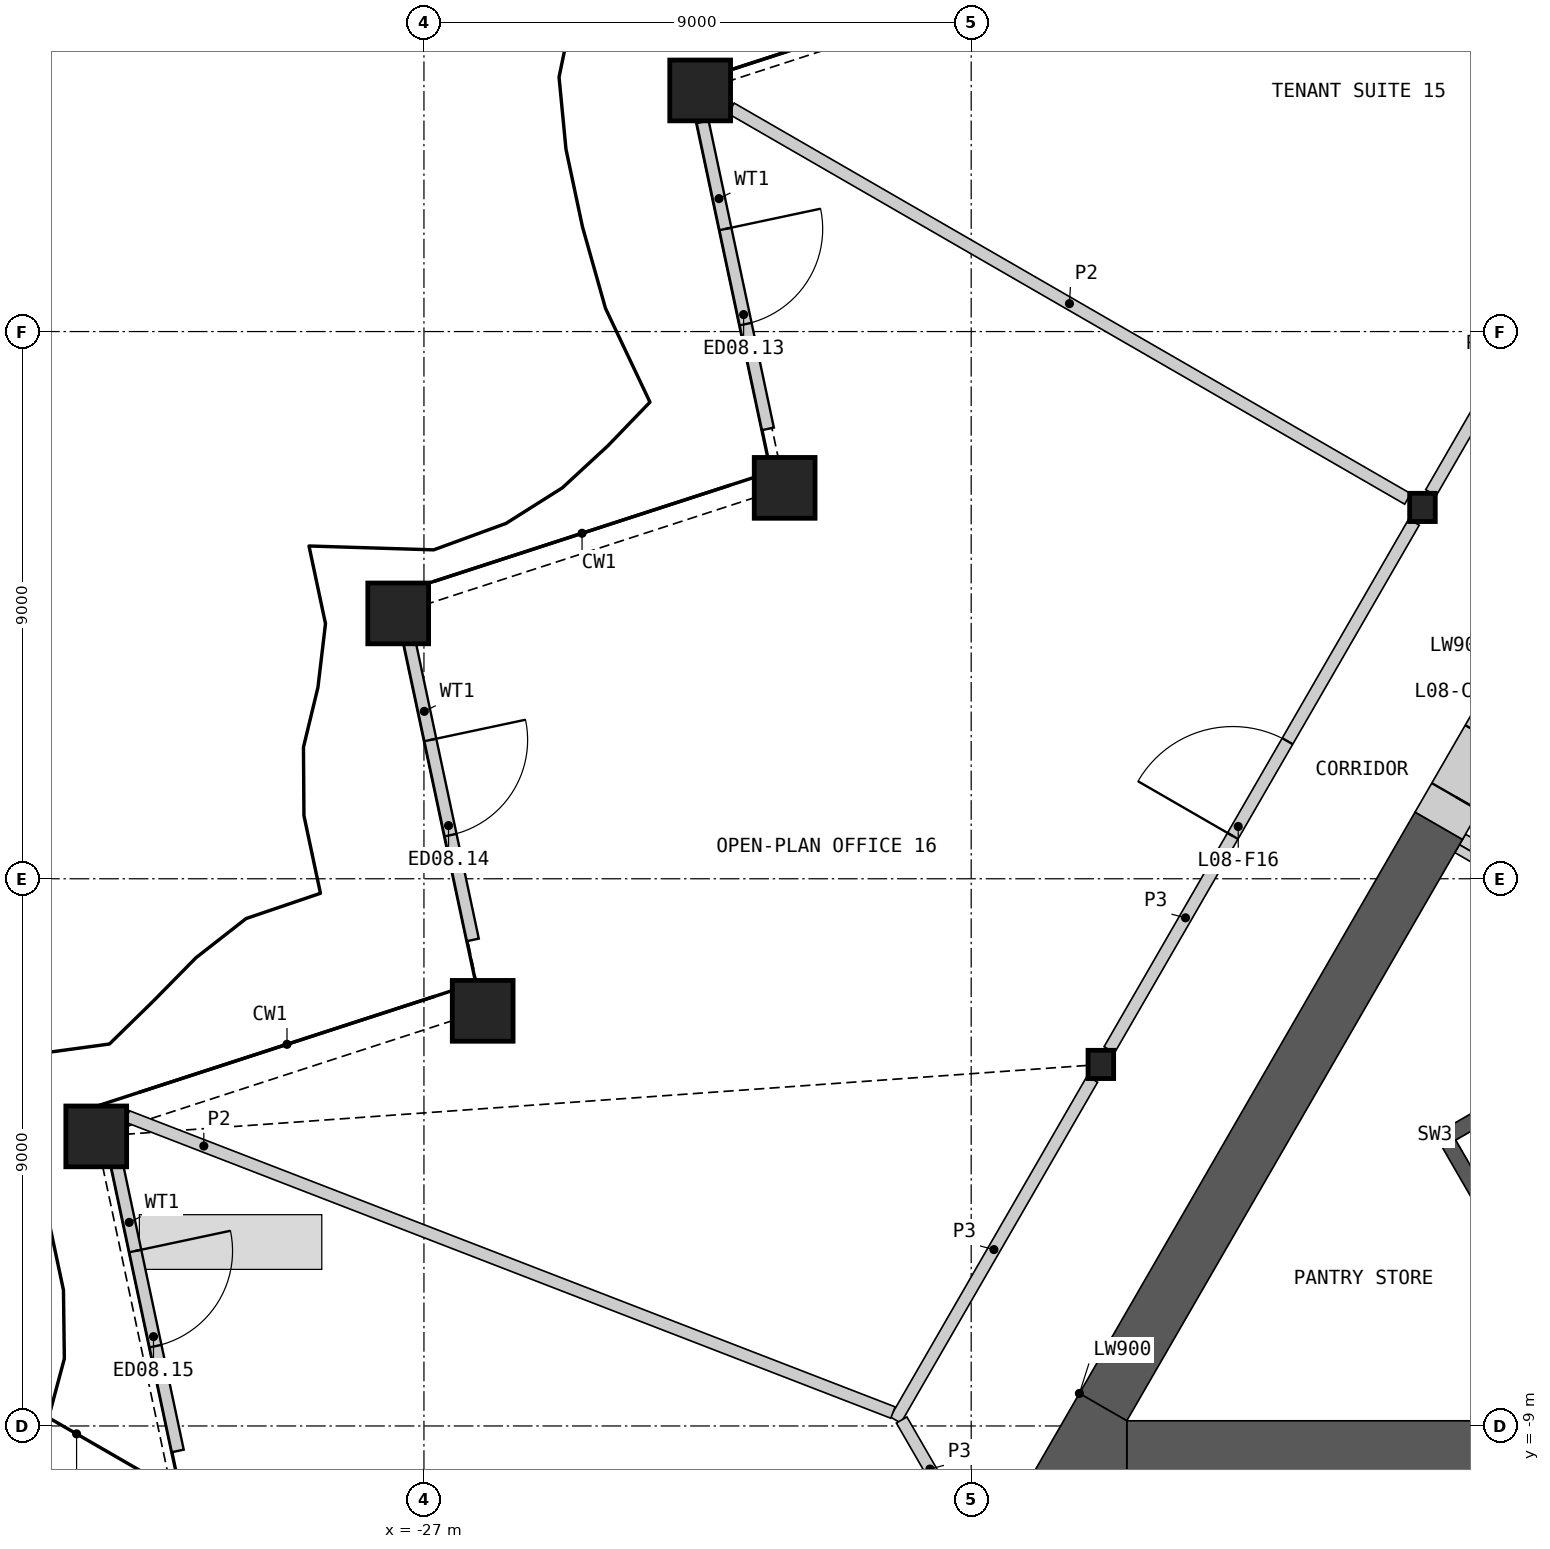
"""IFC4 building model, lengths in metres.
Left out: names, types, materials, properties, quantities, classifications, styles, units other than length and angle.
Written with IfcOpenShell. Run it as: python <this file> out.ifc"""

import sys

from ifc_helpers import new_model, si_unit, direction, frame, frame_2d, origin, origin_2d, place, context, subcontext, project, spatial, polyline, rectangle, hollow_rectangle, i_section, outline, extrude, element, fill, save


model = new_model("IFC4")
c1 = context("Model", 3, precision=1e-05, world=origin(), true_north=direction((0.0, 1.0)))
c2 = subcontext(c1, "Body", "Model", "MODEL_VIEW")
j1 = project(units=[si_unit("LENGTHUNIT", "METRE"), si_unit("PLANEANGLEUNIT", "RADIAN")], contexts=[c1])
p1 = place(None, origin())
s1 = spatial("IfcSite", under=j1, at=p1, CompositionType="ELEMENT")
p2 = place(p1, origin())
s2 = spatial("IfcBuilding", under=s1, at=p2, CompositionType="ELEMENT")
p3 = place(p2, frame((0.0, 0.0, 42.6)))
s3 = spatial("IfcBuildingStorey", under=s2, at=p3, CompositionType="ELEMENT", Elevation=42.6)
for number, where, z_axis, x_axis in (
    (1, (-22.457, 12.966, 0.0), (0.0, 0.0, 1.0), (1.0, 0.0, 0.0)),
    (2, (-21.068, 6.429, 0.0), (0.0, 0.0, 1.0), (1.0, 0.0, 0.0)),
    (3, (-27.423, 4.364, 0.0), (0.0, 0.0, 1.0), (1.0, 0.0, 0.0)),
    (4, (-26.034, -2.172, 0.0), (0.0, 0.0, 1.0), (1.0, 0.0, 0.0)),
    (5, (-32.389, -4.237, 0.0), (0.0, 0.0, 1.0), (1.0, 0.0, 0.0)),
):
    element("IfcColumn", number, at=place(p3, frame(where, z_axis=z_axis, x_axis=x_axis)), inside=s3, PredefinedType="COLUMN", context=c2, shape_type="SweptSolid", body=[
        extrude(hollow_rectangle(XDim=1.0, YDim=1.0, WallThickness=0.07, at=origin_2d()), origin(), (0.0, 0.0, 1.0), 4.2),
    ])
for number, where, z_axis, x_axis in (
    (6, (-10.578, 6.107, 0.0), (0.0, 0.0, 1.0), (1.0, 0.0, 0.0)),
    (7, (-15.868, -3.054, 0.0), (0.0, 0.0, 1.0), (1.0, 0.0, 0.0)),
):
    element("IfcColumn", number, at=place(p3, frame(where, z_axis=z_axis, x_axis=x_axis)), inside=s3, PredefinedType="COLUMN", context=c2, shape_type="SweptSolid", body=[
        extrude(i_section(OverallWidth=0.421, OverallDepth=0.465, WebThickness=0.045, FlangeThickness=0.072, at=origin_2d()), origin(), (0.0, 0.0, 1.0), 4.2),
    ])
p4 = place(p3, frame((-22.416, 12.449, 0.0), z_axis=(0.0, 0.0, 1.0), x_axis=(0.207907400709, -0.978148512615, 0.0)))
e8 = element("IfcWall", 8, at=p4, inside=s3, PredefinedType="SOLIDWALL", context=c2, shape_type="SweptSolid", body=[
    extrude(rectangle(XDim=5.162, YDim=0.2, at=frame_2d((2.581, 0.0))), origin(), (0.0, 0.0, 1.0), 3.189),
])
p5 = place(p4, frame((1.8, 0.0, 0.0)))
e9 = element("IfcOpeningElement", 9, at=p5, cuts=e8, PredefinedType="OPENING", context=c2, shape_type="SweptSolid", body=[
    extrude(rectangle(XDim=1.6, YDim=2.4, at=frame_2d((0.8, 1.2))), frame((0.0, 0.11, 0.0), z_axis=(0.0, -1.0, 0.0), x_axis=(1.0, 0.0, 0.0)), (0.0, 0.0, 1.0), 0.22),
])
p6 = place(p3, frame((-27.261, 4.006, 0.0), z_axis=(0.0, 0.0, 1.0), x_axis=(0.207885539143, -0.978153159079, 0.0)))
e10 = element("IfcWall", 10, at=p6, inside=s3, PredefinedType="SOLIDWALL", context=c2, shape_type="SweptSolid", body=[
    extrude(rectangle(XDim=5.124, YDim=0.2, at=frame_2d((2.562, 0.0))), origin(), (0.0, 0.0, 1.0), 3.189),
])
p7 = place(p6, frame((1.762, 0.0, 0.0)))
e11 = element("IfcOpeningElement", 11, at=p7, cuts=e10, PredefinedType="OPENING", context=c2, shape_type="SweptSolid", body=[
    extrude(rectangle(XDim=1.6, YDim=2.4, at=frame_2d((0.8, 1.2))), frame((0.0, 0.11, 0.0), z_axis=(0.0, -1.0, 0.0), x_axis=(1.0, 0.0, 0.0)), (0.0, 0.0, 1.0), 0.22),
])
p8 = place(p3, frame((-32.114, -4.399, 0.0), z_axis=(0.0, 0.0, 1.0), x_axis=(0.207931126702, -0.978143469307, 0.0)))
e12 = element("IfcWall", 12, at=p8, inside=s3, PredefinedType="SOLIDWALL", context=c2, shape_type="SweptSolid", body=[
    extrude(rectangle(XDim=5.124, YDim=0.2, at=frame_2d((2.562, 0.0))), origin(), (0.0, 0.0, 1.0), 3.189),
])
p9 = place(p8, frame((1.762, 0.0, 0.0)))
e13 = element("IfcOpeningElement", 13, at=p9, cuts=e12, PredefinedType="OPENING", context=c2, shape_type="SweptSolid", body=[
    extrude(rectangle(XDim=1.6, YDim=2.4, at=frame_2d((0.8, 1.2))), frame((0.0, 0.11, 0.0), z_axis=(0.0, -1.0, 0.0), x_axis=(1.0, 0.0, 0.0)), (0.0, 0.0, 1.0), 0.22),
])
p10 = place(p3, frame((-8.181, -0.357, 0.0), z_axis=(0.0, 0.0, 1.0), x_axis=(-0.866035824272, 0.499981950752, 0.0)))
e14 = element("IfcWall", 14, at=p10, inside=s3, PredefinedType="SHEAR", context=c2, shape_type="SweptSolid", body=[
    extrude(rectangle(XDim=2.009, YDim=0.2, at=frame_2d((1.004, 0.0))), origin(), (0.0, 0.0, 1.0), 3.8),
])
p11 = place(p3, origin())
e15 = element("IfcWall", 15, at=p11, inside=s3, PredefinedType="SHEAR", context=c2, shape_type="SweptSolid", body=[
    extrude(outline(polyline([(-5.307, -1.281), (-10.374, -4.206), (-10.032, -4.298), (-5.182, -1.498), (-5.307, -1.281)])), origin(), (0.0, 0.0, 1.0), 3.8),
])
p12 = place(p3, origin())
e16 = element("IfcWall", 16, at=p12, inside=s3, PredefinedType="SHEAR", context=c2, shape_type="SweptSolid", body=[
    extrude(outline(polyline([(-10.374, -4.206), (-8.83, -6.881), (-8.738, -6.539), (-10.032, -4.298), (-10.374, -4.206)])), origin(), (0.0, 0.0, 1.0), 3.8),
])
p13 = place(p3, frame((-8.268, -0.509, 0.0), z_axis=(0.0, 0.0, 1.0), x_axis=(-0.866035824272, 0.499981950752, 0.0)))
e17 = element("IfcWall", 17, at=p13, inside=s3, PredefinedType="PARTITIONING", context=c2, shape_type="SweptSolid", body=[
    extrude(rectangle(XDim=2.009, YDim=0.15, at=frame_2d((1.004, 0.0))), origin(), (0.0, 0.0, 1.0), 3.8),
])
p14 = place(p3, frame((-15.441, -9.365, 0.0), z_axis=(0.0, 0.0, 1.0), x_axis=(1.0, 0.0, 0.0)))
e18 = element("IfcWall", 18, at=p14, inside=s3, PredefinedType="SHEAR", context=c2, shape_type="SweptSolid", body=[
    extrude(rectangle(XDim=8.871, YDim=0.9, at=frame_2d((4.435, 0.0))), origin(), (0.0, 0.0, 1.0), 3.8),
])
p15 = place(p3, frame((-10.31, 0.872, 0.0), z_axis=(0.0, 0.0, 1.0), x_axis=(-0.499991697393, -0.866030197244, 0.0)))
e19 = element("IfcWall", 19, at=p15, inside=s3, PredefinedType="SHEAR", context=c2, shape_type="SweptSolid", body=[
    extrude(rectangle(XDim=11.041, YDim=0.9, at=frame_2d((5.521, 0.0))), origin(), (0.0, 0.0, 1.0), 3.8),
])
p16 = place(p3, origin())
e20 = element("IfcWall", 20, at=p16, inside=s3, PredefinedType="SHEAR", context=c2, shape_type="SweptSolid", body=[
    extrude(outline(polyline([(-16.221, -8.465), (-15.441, -8.915), (-15.441, -9.815), (-17.0, -9.815), (-16.221, -8.465)])), origin(), (0.0, 0.0, 1.0), 3.8),
])
p17 = place(p3, frame((-9.21, 2.777, 0.0), z_axis=(0.0, 0.0, 1.0), x_axis=(-0.500077893725, -0.86598042715, 0.0)))
e21 = element("IfcWall", 21, at=p17, inside=s3, PredefinedType="SHEAR", context=c2, shape_type="SweptSolid", body=[
    extrude(rectangle(XDim=2.2, YDim=0.9, at=frame_2d((1.1, 0.0))), origin(), (0.0, 0.0, 1.0), 3.8),
])
p18 = place(p17, frame((0.55, 0.0, 0.0)))
e22 = element("IfcOpeningElement", 22, at=p18, cuts=e21, PredefinedType="OPENING", context=c2, shape_type="SweptSolid", body=[
    extrude(rectangle(XDim=1.1, YDim=2.1, at=frame_2d((0.55, 1.05))), frame((0.0, 0.46, 0.0), z_axis=(0.0, -1.0, 0.0), x_axis=(1.0, 0.0, 0.0)), (0.0, 0.0, 1.0), 0.92),
])
p19 = place(p3, frame((-10.439, 6.35, 0.0), z_axis=(0.0, 0.0, 1.0), x_axis=(0.50001002959, 0.86601961312, 0.0)))
e23 = element("IfcWall", 23, at=p19, inside=s3, PredefinedType="PARTITIONING", context=c2, shape_type="SweptSolid", body=[
    extrude(rectangle(XDim=10.019, YDim=0.2, at=frame_2d((5.009, 0.0))), origin(), (0.0, 0.0, 1.0), 3.8),
])
p20 = place(p19, frame((4.159, 0.0, 0.0)))
e24 = element("IfcOpeningElement", 24, at=p20, cuts=e23, PredefinedType="OPENING", context=c2, shape_type="SweptSolid", body=[
    extrude(rectangle(XDim=1.0, YDim=2.1, at=frame_2d((0.5, 1.05))), frame((0.0, 0.11, 0.0), z_axis=(0.0, -1.0, 0.0), x_axis=(1.0, 0.0, 0.0)), (0.0, 0.0, 1.0), 0.22),
])
p21 = place(p3, frame((-15.728, -2.811, 0.0), z_axis=(0.0, 0.0, 1.0), x_axis=(0.49999175339, 0.866030164915, 0.0)))
e25 = element("IfcWall", 25, at=p21, inside=s3, PredefinedType="PARTITIONING", context=c2, shape_type="SweptSolid", body=[
    extrude(rectangle(XDim=10.019, YDim=0.2, at=frame_2d((5.009, 0.0))), origin(), (0.0, 0.0, 1.0), 3.8),
])
p22 = place(p21, frame((4.059, 0.0, 0.0)))
e26 = element("IfcOpeningElement", 26, at=p22, cuts=e25, PredefinedType="OPENING", context=c2, shape_type="SweptSolid", body=[
    extrude(rectangle(XDim=1.8, YDim=2.1, at=frame_2d((0.9, 1.05))), frame((0.0, 0.11, 0.0), z_axis=(0.0, -1.0, 0.0), x_axis=(1.0, 0.0, 0.0)), (0.0, 0.0, 1.0), 0.22),
])
p23 = place(p3, frame((-19.244, -8.902, 0.0), z_axis=(0.0, 0.0, 1.0), x_axis=(0.499984737558, 0.86603421538, 0.0)))
e27 = element("IfcWall", 27, at=p23, inside=s3, PredefinedType="PARTITIONING", context=c2, shape_type="SweptSolid", body=[
    extrude(rectangle(XDim=6.473, YDim=0.2, at=frame_2d((3.236, 0.0))), origin(), (0.0, 0.0, 1.0), 3.8),
])
p24 = place(p3, frame((-19.144, -8.902, 0.0), z_axis=(0.0, 0.0, 1.0), x_axis=(0.499958791762, -0.866049194065, 0.0)))
e28 = element("IfcWall", 28, at=p24, inside=s3, PredefinedType="PARTITIONING", context=c2, shape_type="SweptSolid", body=[
    extrude(rectangle(XDim=3.726, YDim=0.2, at=frame_2d((1.863, 0.0))), origin(), (0.0, 0.0, 1.0), 3.8),
])
p25 = place(p24, frame((1.363, 0.0, 0.0)))
e29 = element("IfcOpeningElement", 29, at=p25, cuts=e28, PredefinedType="OPENING", context=c2, shape_type="SweptSolid", body=[
    extrude(rectangle(XDim=1.0, YDim=2.1, at=frame_2d((0.5, 1.05))), frame((0.0, 0.11, 0.0), z_axis=(0.0, -1.0, 0.0), x_axis=(1.0, 0.0, 0.0)), (0.0, 0.0, 1.0), 0.22),
])
p26 = place(p3, frame((-31.879, -3.908, 0.0), z_axis=(0.0, 0.0, 1.0), x_axis=(0.932669586354, -0.360731815467, 0.0)))
e30 = element("IfcWall", 30, at=p26, inside=s3, PredefinedType="PARTITIONING", context=c2, shape_type="SweptSolid", body=[
    extrude(rectangle(XDim=13.501, YDim=0.2, at=frame_2d((6.75, 0.0))), origin(), (0.0, 0.0, 1.0), 2.885),
])
p27 = place(p3, frame((-21.947, 12.671, 0.0), z_axis=(0.0, 0.0, 1.0), x_axis=(0.866026729935, -0.499997703033, 0.0)))
e31 = element("IfcWall", 31, at=p27, inside=s3, PredefinedType="PARTITIONING", context=c2, shape_type="SweptSolid", body=[
    extrude(rectangle(XDim=12.848, YDim=0.2, at=frame_2d((6.424, 0.0))), origin(), (0.0, 0.0, 1.0), 2.885),
])
p28 = place(p5, origin())
e32 = element("IfcDoor", 32, at=p28, inside=s3, OperationType="DOUBLE_DOOR_SINGLE_SWING", PredefinedType="DOOR", context=c2, shape_type="SweptSolid", body=[
    extrude(rectangle(XDim=1.6, YDim=2.4, at=frame_2d((0.8, 1.2))), frame((0.0, 0.025, 0.0), z_axis=(0.0, -1.0, 0.0), x_axis=(1.0, 0.0, 0.0)), (0.0, 0.0, 1.0), 0.05),
])
fill(e9, e32)
p29 = place(p7, origin())
e33 = element("IfcDoor", 33, at=p29, inside=s3, OperationType="DOUBLE_DOOR_SINGLE_SWING", PredefinedType="DOOR", context=c2, shape_type="SweptSolid", body=[
    extrude(rectangle(XDim=1.6, YDim=2.4, at=frame_2d((0.8, 1.2))), frame((0.0, 0.025, 0.0), z_axis=(0.0, -1.0, 0.0), x_axis=(1.0, 0.0, 0.0)), (0.0, 0.0, 1.0), 0.05),
])
fill(e11, e33)
p30 = place(p9, origin())
e34 = element("IfcDoor", 34, at=p30, inside=s3, OperationType="DOUBLE_DOOR_SINGLE_SWING", PredefinedType="DOOR", context=c2, shape_type="SweptSolid", body=[
    extrude(rectangle(XDim=1.6, YDim=2.4, at=frame_2d((0.8, 1.2))), frame((0.0, 0.025, 0.0), z_axis=(0.0, -1.0, 0.0), x_axis=(1.0, 0.0, 0.0)), (0.0, 0.0, 1.0), 0.05),
])
fill(e13, e34)
p31 = place(p18, origin())
e35 = element("IfcDoor", 35, at=p31, inside=s3, OperationType="SINGLE_SWING_RIGHT", PredefinedType="DOOR", context=c2, shape_type="SweptSolid", body=[
    extrude(rectangle(XDim=1.1, YDim=2.1, at=frame_2d((0.55, 1.05))), frame((0.0, 0.205, 0.0), z_axis=(0.0, -1.0, 0.0), x_axis=(1.0, 0.0, 0.0)), (0.0, 0.0, 1.0), 0.05),
])
fill(e22, e35)
p32 = place(p22, origin())
e36 = element("IfcDoor", 36, at=p32, inside=s3, OperationType="DOUBLE_DOOR_SINGLE_SWING", PredefinedType="DOOR", context=c2, shape_type="SweptSolid", body=[
    extrude(rectangle(XDim=1.8, YDim=2.1, at=frame_2d((0.9, 1.05))), frame((0.0, 0.025, 0.0), z_axis=(0.0, -1.0, 0.0), x_axis=(1.0, 0.0, 0.0)), (0.0, 0.0, 1.0), 0.05),
])
fill(e26, e36)
save(model, sys.argv[1])
